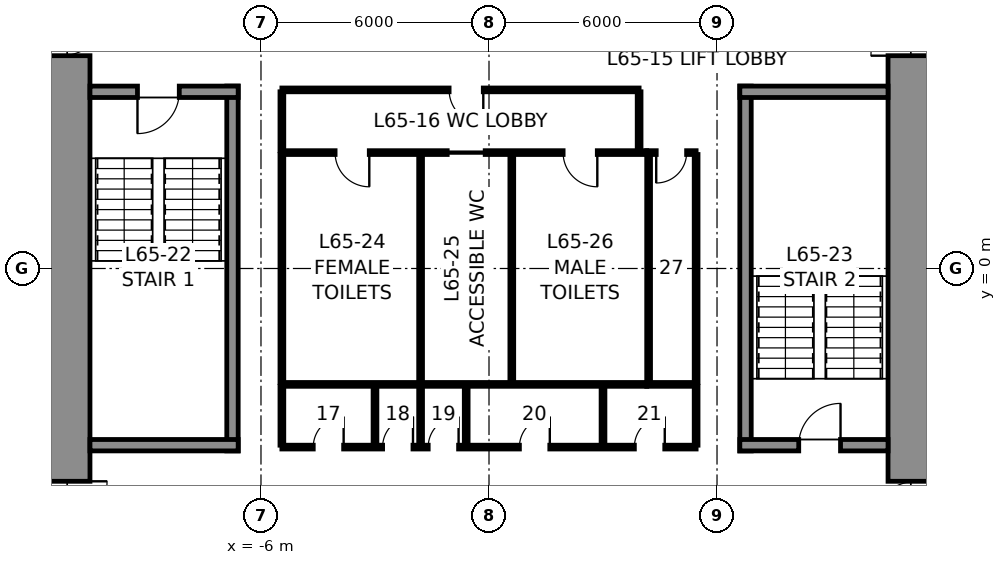
"""IFC4 building model, lengths in metres.
Left out: names, types, materials, properties, quantities, classifications, styles, units other than length and angle.
Written with IfcOpenShell. Run it as: python <this file> out.ifc"""

import sys

from ifc_helpers import new_model, si_unit, direction, frame, frame_2d, origin, place, context, subcontext, project, spatial, rectangle, extrude, element, fill, save


model = new_model("IFC4")
c1 = context("Model", 3, precision=1e-05, world=origin(), true_north=direction((0.0, 1.0)))
c2 = subcontext(c1, "Body", "Model", "MODEL_VIEW")
j1 = project(units=[si_unit("LENGTHUNIT", "METRE"), si_unit("PLANEANGLEUNIT", "RADIAN")], contexts=[c1])
p1 = place(None, origin())
s1 = spatial("IfcSite", under=j1, at=p1, CompositionType="ELEMENT")
p2 = place(p1, origin())
s2 = spatial("IfcBuilding", under=s1, at=p2, CompositionType="ELEMENT")
p3 = place(p2, frame((0.0, 0.0, 289.8)))
s3 = spatial("IfcBuildingStorey", under=s2, at=p3, CompositionType="ELEMENT", Elevation=289.8)
p4 = place(p3, frame((11.25, 10.5, 0.0), z_axis=(0.0, 0.0, 1.0), x_axis=(0.0, -1.0, 0.0)))
e1 = element("IfcWall", 1, at=p4, inside=s3, PredefinedType="SHEAR", context=c2, shape_type="SweptSolid", body=[
    extrude(rectangle(XDim=21.0, YDim=1.5, at=frame_2d((10.5, 0.0))), origin(), (0.0, 0.0, 1.0), 4.0),
])
p5 = place(p4, frame((3.7, 0.0, 0.0)))
e2 = element("IfcOpeningElement", 2, at=p5, cuts=e1, PredefinedType="OPENING", context=c2, shape_type="SweptSolid", body=[
    extrude(rectangle(XDim=1.2, YDim=2.3, at=frame_2d((0.6, 1.15))), frame((0.0, 0.76, 0.0), z_axis=(0.0, -1.0, 0.0), x_axis=(1.0, 0.0, 0.0)), (0.0, 0.0, 1.0), 1.52),
])
p6 = place(p4, frame((16.1, 0.0, 0.0)))
e3 = element("IfcOpeningElement", 3, at=p6, cuts=e1, PredefinedType="OPENING", context=c2, shape_type="SweptSolid", body=[
    extrude(rectangle(XDim=1.2, YDim=2.3, at=frame_2d((0.6, 1.15))), frame((0.0, 0.76, 0.0), z_axis=(0.0, -1.0, 0.0), x_axis=(1.0, 0.0, 0.0)), (0.0, 0.0, 1.0), 1.52),
])
p7 = place(p3, frame((-11.25, -10.5, 0.0), z_axis=(0.0, 0.0, 1.0), x_axis=(0.0, 1.0, 0.0)))
e4 = element("IfcWall", 4, at=p7, inside=s3, PredefinedType="SHEAR", context=c2, shape_type="SweptSolid", body=[
    extrude(rectangle(XDim=21.0, YDim=1.5, at=frame_2d((10.5, 0.0))), origin(), (0.0, 0.0, 1.0), 4.0),
])
p8 = place(p7, frame((16.1, 0.0, 0.0)))
e5 = element("IfcOpeningElement", 5, at=p8, cuts=e4, PredefinedType="OPENING", context=c2, shape_type="SweptSolid", body=[
    extrude(rectangle(XDim=1.2, YDim=2.3, at=frame_2d((0.6, 1.15))), frame((0.0, 0.76, 0.0), z_axis=(0.0, -1.0, 0.0), x_axis=(1.0, 0.0, 0.0)), (0.0, 0.0, 1.0), 1.52),
])
p9 = place(p7, frame((3.7, 0.0, 0.0)))
e6 = element("IfcOpeningElement", 6, at=p9, cuts=e4, PredefinedType="OPENING", context=c2, shape_type="SweptSolid", body=[
    extrude(rectangle(XDim=1.2, YDim=2.3, at=frame_2d((0.6, 1.15))), frame((0.0, 0.76, 0.0), z_axis=(0.0, -1.0, 0.0), x_axis=(1.0, 0.0, 0.0)), (0.0, 0.0, 1.0), 1.52),
])
p10 = place(p3, frame((-6.75, -4.8, 0.0), z_axis=(0.0, 0.0, 1.0), x_axis=(0.0, 1.0, 0.0)))
e7 = element("IfcWall", 7, at=p10, inside=s3, PredefinedType="SOLIDWALL", context=c2, shape_type="SweptSolid", body=[
    extrude(rectangle(XDim=9.6, YDim=0.3, at=frame_2d((4.8, 0.0))), origin(), (0.0, 0.0, 1.0), 3.75),
])
p11 = place(p3, frame((-10.5, 4.65, 0.0), z_axis=(0.0, 0.0, 1.0), x_axis=(1.0, 0.0, 0.0)))
e8 = element("IfcWall", 8, at=p11, inside=s3, PredefinedType="SOLIDWALL", context=c2, shape_type="SweptSolid", body=[
    extrude(rectangle(XDim=3.9, YDim=0.3, at=frame_2d((1.95, 0.0))), origin(), (0.0, 0.0, 1.0), 3.75),
])
p12 = place(p11, frame((1.25, 0.0, 0.0)))
e9 = element("IfcOpeningElement", 9, at=p12, cuts=e8, PredefinedType="OPENING", context=c2, shape_type="SweptSolid", body=[
    extrude(rectangle(XDim=1.1, YDim=2.3, at=frame_2d((0.55, 1.15))), frame((0.0, 0.16, 0.0), z_axis=(0.0, -1.0, 0.0), x_axis=(1.0, 0.0, 0.0)), (0.0, 0.0, 1.0), 0.32),
])
p13 = place(p3, frame((-6.6, -4.65, 0.0), z_axis=(0.0, 0.0, 1.0), x_axis=(-1.0, 0.0, 0.0)))
e10 = element("IfcWall", 10, at=p13, inside=s3, PredefinedType="SOLIDWALL", context=c2, shape_type="SweptSolid", body=[
    extrude(rectangle(XDim=3.9, YDim=0.3, at=frame_2d((1.95, 0.0))), origin(), (0.0, 0.0, 1.0), 3.75),
])
p14 = place(p3, frame((6.75, -4.8, 0.0), z_axis=(0.0, 0.0, 1.0), x_axis=(0.0, 1.0, 0.0)))
e11 = element("IfcWall", 11, at=p14, inside=s3, PredefinedType="SOLIDWALL", context=c2, shape_type="SweptSolid", body=[
    extrude(rectangle(XDim=9.6, YDim=0.3, at=frame_2d((4.8, 0.0))), origin(), (0.0, 0.0, 1.0), 3.75),
])
p15 = place(p3, frame((6.6, 4.65, 0.0), z_axis=(0.0, 0.0, 1.0), x_axis=(1.0, 0.0, 0.0)))
e12 = element("IfcWall", 12, at=p15, inside=s3, PredefinedType="SOLIDWALL", context=c2, shape_type="SweptSolid", body=[
    extrude(rectangle(XDim=3.9, YDim=0.3, at=frame_2d((1.95, 0.0))), origin(), (0.0, 0.0, 1.0), 3.75),
])
p16 = place(p3, frame((10.5, -4.65, 0.0), z_axis=(0.0, 0.0, 1.0), x_axis=(-1.0, 0.0, 0.0)))
e13 = element("IfcWall", 13, at=p16, inside=s3, PredefinedType="SOLIDWALL", context=c2, shape_type="SweptSolid", body=[
    extrude(rectangle(XDim=3.9, YDim=0.3, at=frame_2d((1.95, 0.0))), origin(), (0.0, 0.0, 1.0), 3.75),
])
p17 = place(p16, frame((1.25, 0.0, 0.0)))
e14 = element("IfcOpeningElement", 14, at=p17, cuts=e13, PredefinedType="OPENING", context=c2, shape_type="SweptSolid", body=[
    extrude(rectangle(XDim=1.1, YDim=2.3, at=frame_2d((0.55, 1.15))), frame((0.0, 0.16, 0.0), z_axis=(0.0, -1.0, 0.0), x_axis=(1.0, 0.0, 0.0)), (0.0, 0.0, 1.0), 0.32),
])
p18 = place(p3, frame((-5.45, 3.05, 0.0), z_axis=(0.0, 0.0, 1.0), x_axis=(1.0, 0.0, 0.0)))
e15 = element("IfcWall", 15, at=p18, inside=s3, PredefinedType="PARTITIONING", context=c2, shape_type="SweptSolid", body=[
    extrude(rectangle(XDim=9.6, YDim=0.1, at=frame_2d((4.8, 0.0))), origin(), (0.0, 0.0, 1.0), 3.75),
])
p19 = place(p18, frame((1.4, 0.0, 0.0)))
e16 = element("IfcOpeningElement", 16, at=p19, cuts=e15, PredefinedType="OPENING", context=c2, shape_type="SweptSolid", body=[
    extrude(rectangle(XDim=0.9, YDim=2.3, at=frame_2d((0.45, 1.15))), frame((0.0, 0.06, 0.0), z_axis=(0.0, -1.0, 0.0), x_axis=(1.0, 0.0, 0.0)), (0.0, 0.0, 1.0), 0.12),
])
p20 = place(p18, frame((4.35, 0.0, 0.0)))
e17 = element("IfcOpeningElement", 17, at=p20, cuts=e15, PredefinedType="OPENING", context=c2, shape_type="SweptSolid", body=[
    extrude(rectangle(XDim=1.0, YDim=2.3, at=frame_2d((0.5, 1.15))), frame((0.0, 0.06, 0.0), z_axis=(0.0, -1.0, 0.0), x_axis=(1.0, 0.0, 0.0)), (0.0, 0.0, 1.0), 0.12),
])
p21 = place(p18, frame((7.4, 0.0, 0.0)))
e18 = element("IfcOpeningElement", 18, at=p21, cuts=e15, PredefinedType="OPENING", context=c2, shape_type="SweptSolid", body=[
    extrude(rectangle(XDim=0.9, YDim=2.3, at=frame_2d((0.45, 1.15))), frame((0.0, 0.06, 0.0), z_axis=(0.0, -1.0, 0.0), x_axis=(1.0, 0.0, 0.0)), (0.0, 0.0, 1.0), 0.12),
])
p22 = place(p3, frame((4.15, 3.05, 0.0), z_axis=(0.0, 0.0, 1.0), x_axis=(1.0, 0.0, 0.0)))
e19 = element("IfcWall", 19, at=p22, inside=s3, PredefinedType="PARTITIONING", context=c2, shape_type="SweptSolid", body=[
    extrude(rectangle(XDim=1.3, YDim=0.1, at=frame_2d((0.65, 0.0))), origin(), (0.0, 0.0, 1.0), 3.75),
])
p23 = place(p22, frame((0.25, 0.0, 0.0)))
e20 = element("IfcOpeningElement", 20, at=p23, cuts=e19, PredefinedType="OPENING", context=c2, shape_type="SweptSolid", body=[
    extrude(rectangle(XDim=0.8, YDim=2.3, at=frame_2d((0.4, 1.15))), frame((0.0, 0.06, 0.0), z_axis=(0.0, -1.0, 0.0), x_axis=(1.0, 0.0, 0.0)), (0.0, 0.0, 1.0), 0.12),
])
p24 = place(p3, frame((4.15, -3.05, 0.0), z_axis=(0.0, 0.0, 1.0), x_axis=(-1.0, 0.0, 0.0)))
e21 = element("IfcWall", 21, at=p24, inside=s3, PredefinedType="PARTITIONING", context=c2, shape_type="SweptSolid", body=[
    extrude(rectangle(XDim=9.6, YDim=0.1, at=frame_2d((4.8, 0.0))), origin(), (0.0, 0.0, 1.0), 3.75),
])
p25 = place(p3, frame((5.45, -3.05, 0.0), z_axis=(0.0, 0.0, 1.0), x_axis=(-1.0, 0.0, 0.0)))
e22 = element("IfcWall", 22, at=p25, inside=s3, PredefinedType="PARTITIONING", context=c2, shape_type="SweptSolid", body=[
    extrude(rectangle(XDim=1.3, YDim=0.1, at=frame_2d((0.65, 0.0))), origin(), (0.0, 0.0, 1.0), 3.75),
])
for number, where, z_axis, x_axis in (
    (23, (5.45, 3.0, 0.0), (0.0, 0.0, 1.0), (0.0, -1.0, 0.0)),
    (24, (-5.45, -3.0, 0.0), (0.0, 0.0, 1.0), (0.0, 1.0, 0.0)),
    (25, (-1.8, -3.0, 0.0), (0.0, 0.0, 1.0), (0.0, 1.0, 0.0)),
    (26, (0.6, -3.0, 0.0), (0.0, 0.0, 1.0), (0.0, 1.0, 0.0)),
    (27, (4.2, -3.0, 0.0), (0.0, 0.0, 1.0), (0.0, 1.0, 0.0)),
):
    element("IfcWall", number, at=place(p3, frame(where, z_axis=z_axis, x_axis=x_axis)), inside=s3, PredefinedType="PARTITIONING", context=c2, shape_type="SweptSolid", body=[
        extrude(rectangle(XDim=6.0, YDim=0.1, at=frame_2d((3.0, 0.0))), origin(), (0.0, 0.0, 1.0), 3.75),
    ])
p26 = place(p3, frame((-5.45, 4.7, 0.0), z_axis=(0.0, 0.0, 1.0), x_axis=(1.0, 0.0, 0.0)))
e28 = element("IfcWall", 28, at=p26, inside=s3, PredefinedType="PARTITIONING", context=c2, shape_type="SweptSolid", body=[
    extrude(rectangle(XDim=9.4, YDim=0.1, at=frame_2d((4.7, 0.0))), origin(), (0.0, 0.0, 1.0), 3.75),
])
p27 = place(p26, frame((4.4, 0.0, 0.0)))
e29 = element("IfcOpeningElement", 29, at=p27, cuts=e28, PredefinedType="OPENING", context=c2, shape_type="SweptSolid", body=[
    extrude(rectangle(XDim=0.9, YDim=2.3, at=frame_2d((0.45, 1.15))), frame((0.0, 0.06, 0.0), z_axis=(0.0, -1.0, 0.0), x_axis=(1.0, 0.0, 0.0)), (0.0, 0.0, 1.0), 0.12),
])
for number, where, z_axis, x_axis in (
    (30, (-5.45, 3.1, 0.0), (0.0, 0.0, 1.0), (0.0, 1.0, 0.0)),
    (31, (3.95, 3.1, 0.0), (0.0, 0.0, 1.0), (0.0, 1.0, 0.0)),
):
    element("IfcWall", number, at=place(p3, frame(where, z_axis=z_axis, x_axis=x_axis)), inside=s3, PredefinedType="PARTITIONING", context=c2, shape_type="SweptSolid", body=[
        extrude(rectangle(XDim=1.55, YDim=0.1, at=frame_2d((0.775, 0.0))), origin(), (0.0, 0.0, 1.0), 3.75),
    ])
p28 = place(p3, frame((5.45, -4.7, 0.0), z_axis=(0.0, 0.0, 1.0), x_axis=(-1.0, 0.0, 0.0)))
e32 = element("IfcWall", 32, at=p28, inside=s3, PredefinedType="PARTITIONING", context=c2, shape_type="SweptSolid", body=[
    extrude(rectangle(XDim=10.9, YDim=0.1, at=frame_2d((5.45, 0.0))), origin(), (0.0, 0.0, 1.0), 3.75),
])
p29 = place(p28, frame((9.275, 0.0, 0.0)))
e33 = element("IfcOpeningElement", 33, at=p29, cuts=e32, PredefinedType="OPENING", context=c2, shape_type="SweptSolid", body=[
    extrude(rectangle(XDim=0.8, YDim=2.3, at=frame_2d((0.4, 1.15))), frame((0.0, 0.06, 0.0), z_axis=(0.0, -1.0, 0.0), x_axis=(1.0, 0.0, 0.0)), (0.0, 0.0, 1.0), 0.12),
])
p30 = place(p28, frame((7.45, 0.0, 0.0)))
e34 = element("IfcOpeningElement", 34, at=p30, cuts=e32, PredefinedType="OPENING", context=c2, shape_type="SweptSolid", body=[
    extrude(rectangle(XDim=0.8, YDim=2.3, at=frame_2d((0.4, 1.15))), frame((0.0, 0.06, 0.0), z_axis=(0.0, -1.0, 0.0), x_axis=(1.0, 0.0, 0.0)), (0.0, 0.0, 1.0), 0.12),
])
p31 = place(p28, frame((6.25, 0.0, 0.0)))
e35 = element("IfcOpeningElement", 35, at=p31, cuts=e32, PredefinedType="OPENING", context=c2, shape_type="SweptSolid", body=[
    extrude(rectangle(XDim=0.8, YDim=2.3, at=frame_2d((0.4, 1.15))), frame((0.0, 0.06, 0.0), z_axis=(0.0, -1.0, 0.0), x_axis=(1.0, 0.0, 0.0)), (0.0, 0.0, 1.0), 0.12),
])
p32 = place(p28, frame((3.85, 0.0, 0.0)))
e36 = element("IfcOpeningElement", 36, at=p32, cuts=e32, PredefinedType="OPENING", context=c2, shape_type="SweptSolid", body=[
    extrude(rectangle(XDim=0.8, YDim=2.3, at=frame_2d((0.4, 1.15))), frame((0.0, 0.06, 0.0), z_axis=(0.0, -1.0, 0.0), x_axis=(1.0, 0.0, 0.0)), (0.0, 0.0, 1.0), 0.12),
])
p33 = place(p28, frame((0.825, 0.0, 0.0)))
e37 = element("IfcOpeningElement", 37, at=p33, cuts=e32, PredefinedType="OPENING", context=c2, shape_type="SweptSolid", body=[
    extrude(rectangle(XDim=0.8, YDim=2.3, at=frame_2d((0.4, 1.15))), frame((0.0, 0.06, 0.0), z_axis=(0.0, -1.0, 0.0), x_axis=(1.0, 0.0, 0.0)), (0.0, 0.0, 1.0), 0.12),
])
for number, where, z_axis, x_axis in (
    (38, (-5.45, -3.1, 0.0), (0.0, 0.0, 1.0), (0.0, -1.0, 0.0)),
    (39, (5.45, -3.1, 0.0), (0.0, 0.0, 1.0), (0.0, -1.0, 0.0)),
    (40, (-3.0, -3.1, 0.0), (0.0, 0.0, 1.0), (0.0, -1.0, 0.0)),
    (41, (-1.8, -3.1, 0.0), (0.0, 0.0, 1.0), (0.0, -1.0, 0.0)),
    (42, (-0.6, -3.1, 0.0), (0.0, 0.0, 1.0), (0.0, -1.0, 0.0)),
    (43, (3.0, -3.1, 0.0), (0.0, 0.0, 1.0), (0.0, -1.0, 0.0)),
):
    element("IfcWall", number, at=place(p3, frame(where, z_axis=z_axis, x_axis=x_axis)), inside=s3, PredefinedType="PARTITIONING", context=c2, shape_type="SweptSolid", body=[
        extrude(rectangle(XDim=1.55, YDim=0.1, at=frame_2d((0.775, 0.0))), origin(), (0.0, 0.0, 1.0), 3.75),
    ])
p34 = place(p12, frame((1.1, 0.0, 0.0), z_axis=(0.0, 0.0, 1.0), x_axis=(-1.0, 0.0, 0.0)))
e44 = element("IfcDoor", 44, at=p34, inside=s3, OperationType="SINGLE_SWING_RIGHT", PredefinedType="DOOR", context=c2, shape_type="SweptSolid", body=[
    extrude(rectangle(XDim=1.1, YDim=2.3, at=frame_2d((0.55, 1.15))), frame((0.0, 0.025, 0.0), z_axis=(0.0, -1.0, 0.0), x_axis=(1.0, 0.0, 0.0)), (0.0, 0.0, 1.0), 0.05),
])
fill(e9, e44)
p35 = place(p17, frame((1.1, 0.0, 0.0), z_axis=(0.0, 0.0, 1.0), x_axis=(-1.0, 0.0, 0.0)))
e45 = element("IfcDoor", 45, at=p35, inside=s3, OperationType="SINGLE_SWING_RIGHT", PredefinedType="DOOR", context=c2, shape_type="SweptSolid", body=[
    extrude(rectangle(XDim=1.1, YDim=2.3, at=frame_2d((0.55, 1.15))), frame((0.0, 0.025, 0.0), z_axis=(0.0, -1.0, 0.0), x_axis=(1.0, 0.0, 0.0)), (0.0, 0.0, 1.0), 0.05),
])
fill(e14, e45)
p36 = place(p19, frame((0.9, 0.0, 0.0), z_axis=(0.0, 0.0, 1.0), x_axis=(-1.0, 0.0, 0.0)))
e46 = element("IfcDoor", 46, at=p36, inside=s3, OperationType="SINGLE_SWING_LEFT", PredefinedType="DOOR", context=c2, shape_type="SweptSolid", body=[
    extrude(rectangle(XDim=0.9, YDim=2.3, at=frame_2d((0.45, 1.15))), frame((0.0, 0.025, 0.0), z_axis=(0.0, -1.0, 0.0), x_axis=(1.0, 0.0, 0.0)), (0.0, 0.0, 1.0), 0.05),
])
fill(e16, e46)
p37 = place(p20, frame((1.0, 0.0, 0.0), z_axis=(0.0, 0.0, 1.0), x_axis=(-1.0, 0.0, 0.0)))
e47 = element("IfcDoor", 47, at=p37, inside=s3, OperationType="SLIDING_TO_LEFT", PredefinedType="DOOR", context=c2, shape_type="SweptSolid", body=[
    extrude(rectangle(XDim=1.0, YDim=2.3, at=frame_2d((0.5, 1.15))), frame((0.0, 0.025, 0.0), z_axis=(0.0, -1.0, 0.0), x_axis=(1.0, 0.0, 0.0)), (0.0, 0.0, 1.0), 0.05),
])
fill(e17, e47)
p38 = place(p21, frame((0.9, 0.0, 0.0), z_axis=(0.0, 0.0, 1.0), x_axis=(-1.0, 0.0, 0.0)))
e48 = element("IfcDoor", 48, at=p38, inside=s3, OperationType="SINGLE_SWING_LEFT", PredefinedType="DOOR", context=c2, shape_type="SweptSolid", body=[
    extrude(rectangle(XDim=0.9, YDim=2.3, at=frame_2d((0.45, 1.15))), frame((0.0, 0.025, 0.0), z_axis=(0.0, -1.0, 0.0), x_axis=(1.0, 0.0, 0.0)), (0.0, 0.0, 1.0), 0.05),
])
fill(e18, e48)
p39 = place(p23, frame((0.8, 0.0, 0.0), z_axis=(0.0, 0.0, 1.0), x_axis=(-1.0, 0.0, 0.0)))
e49 = element("IfcDoor", 49, at=p39, inside=s3, OperationType="SINGLE_SWING_RIGHT", PredefinedType="DOOR", context=c2, shape_type="SweptSolid", body=[
    extrude(rectangle(XDim=0.8, YDim=2.3, at=frame_2d((0.4, 1.15))), frame((0.0, 0.025, 0.0), z_axis=(0.0, -1.0, 0.0), x_axis=(1.0, 0.0, 0.0)), (0.0, 0.0, 1.0), 0.05),
])
fill(e20, e49)
p40 = place(p27, frame((0.9, 0.0, 0.0), z_axis=(0.0, 0.0, 1.0), x_axis=(-1.0, 0.0, 0.0)))
e50 = element("IfcDoor", 50, at=p40, inside=s3, OperationType="SINGLE_SWING_LEFT", PredefinedType="DOOR", context=c2, shape_type="SweptSolid", body=[
    extrude(rectangle(XDim=0.9, YDim=2.3, at=frame_2d((0.45, 1.15))), frame((0.0, 0.025, 0.0), z_axis=(0.0, -1.0, 0.0), x_axis=(1.0, 0.0, 0.0)), (0.0, 0.0, 1.0), 0.05),
])
fill(e29, e50)
p41 = place(p29, frame((0.8, 0.0, 0.0), z_axis=(0.0, 0.0, 1.0), x_axis=(-1.0, 0.0, 0.0)))
e51 = element("IfcDoor", 51, at=p41, inside=s3, OperationType="SINGLE_SWING_RIGHT", PredefinedType="DOOR", context=c2, shape_type="SweptSolid", body=[
    extrude(rectangle(XDim=0.8, YDim=2.3, at=frame_2d((0.4, 1.15))), frame((0.0, 0.025, 0.0), z_axis=(0.0, -1.0, 0.0), x_axis=(1.0, 0.0, 0.0)), (0.0, 0.0, 1.0), 0.05),
])
fill(e33, e51)
p42 = place(p30, frame((0.8, 0.0, 0.0), z_axis=(0.0, 0.0, 1.0), x_axis=(-1.0, 0.0, 0.0)))
e52 = element("IfcDoor", 52, at=p42, inside=s3, OperationType="SINGLE_SWING_RIGHT", PredefinedType="DOOR", context=c2, shape_type="SweptSolid", body=[
    extrude(rectangle(XDim=0.8, YDim=2.3, at=frame_2d((0.4, 1.15))), frame((0.0, 0.025, 0.0), z_axis=(0.0, -1.0, 0.0), x_axis=(1.0, 0.0, 0.0)), (0.0, 0.0, 1.0), 0.05),
])
fill(e34, e52)
p43 = place(p31, frame((0.8, 0.0, 0.0), z_axis=(0.0, 0.0, 1.0), x_axis=(-1.0, 0.0, 0.0)))
e53 = element("IfcDoor", 53, at=p43, inside=s3, OperationType="SINGLE_SWING_RIGHT", PredefinedType="DOOR", context=c2, shape_type="SweptSolid", body=[
    extrude(rectangle(XDim=0.8, YDim=2.3, at=frame_2d((0.4, 1.15))), frame((0.0, 0.025, 0.0), z_axis=(0.0, -1.0, 0.0), x_axis=(1.0, 0.0, 0.0)), (0.0, 0.0, 1.0), 0.05),
])
fill(e35, e53)
p44 = place(p32, frame((0.8, 0.0, 0.0), z_axis=(0.0, 0.0, 1.0), x_axis=(-1.0, 0.0, 0.0)))
e54 = element("IfcDoor", 54, at=p44, inside=s3, OperationType="SINGLE_SWING_RIGHT", PredefinedType="DOOR", context=c2, shape_type="SweptSolid", body=[
    extrude(rectangle(XDim=0.8, YDim=2.3, at=frame_2d((0.4, 1.15))), frame((0.0, 0.025, 0.0), z_axis=(0.0, -1.0, 0.0), x_axis=(1.0, 0.0, 0.0)), (0.0, 0.0, 1.0), 0.05),
])
fill(e36, e54)
p45 = place(p33, frame((0.8, 0.0, 0.0), z_axis=(0.0, 0.0, 1.0), x_axis=(-1.0, 0.0, 0.0)))
e55 = element("IfcDoor", 55, at=p45, inside=s3, OperationType="SINGLE_SWING_RIGHT", PredefinedType="DOOR", context=c2, shape_type="SweptSolid", body=[
    extrude(rectangle(XDim=0.8, YDim=2.3, at=frame_2d((0.4, 1.15))), frame((0.0, 0.025, 0.0), z_axis=(0.0, -1.0, 0.0), x_axis=(1.0, 0.0, 0.0)), (0.0, 0.0, 1.0), 0.05),
])
fill(e37, e55)
p46 = place(p8, frame((1.2, 0.0, 0.0), z_axis=(0.0, 0.0, 1.0), x_axis=(-1.0, 0.0, 0.0)))
e56 = element("IfcDoor", 56, at=p46, inside=s3, OperationType="SINGLE_SWING_LEFT", PredefinedType="DOOR", context=c2, shape_type="SweptSolid", body=[
    extrude(rectangle(XDim=1.2, YDim=2.3, at=frame_2d((0.6, 1.15))), frame((0.0, 0.025, 0.0), z_axis=(0.0, -1.0, 0.0), x_axis=(1.0, 0.0, 0.0)), (0.0, 0.0, 1.0), 0.05),
])
fill(e5, e56)
p47 = place(p9, frame((1.2, 0.0, 0.0), z_axis=(0.0, 0.0, 1.0), x_axis=(-1.0, 0.0, 0.0)))
e57 = element("IfcDoor", 57, at=p47, inside=s3, OperationType="SINGLE_SWING_LEFT", PredefinedType="DOOR", context=c2, shape_type="SweptSolid", body=[
    extrude(rectangle(XDim=1.2, YDim=2.3, at=frame_2d((0.6, 1.15))), frame((0.0, 0.025, 0.0), z_axis=(0.0, -1.0, 0.0), x_axis=(1.0, 0.0, 0.0)), (0.0, 0.0, 1.0), 0.05),
])
fill(e6, e57)
p48 = place(p5, frame((1.2, 0.0, 0.0), z_axis=(0.0, 0.0, 1.0), x_axis=(-1.0, 0.0, 0.0)))
e58 = element("IfcDoor", 58, at=p48, inside=s3, OperationType="SINGLE_SWING_LEFT", PredefinedType="DOOR", context=c2, shape_type="SweptSolid", body=[
    extrude(rectangle(XDim=1.2, YDim=2.3, at=frame_2d((0.6, 1.15))), frame((0.0, 0.025, 0.0), z_axis=(0.0, -1.0, 0.0), x_axis=(1.0, 0.0, 0.0)), (0.0, 0.0, 1.0), 0.05),
])
fill(e2, e58)
p49 = place(p6, frame((1.2, 0.0, 0.0), z_axis=(0.0, 0.0, 1.0), x_axis=(-1.0, 0.0, 0.0)))
e59 = element("IfcDoor", 59, at=p49, inside=s3, OperationType="SINGLE_SWING_LEFT", PredefinedType="DOOR", context=c2, shape_type="SweptSolid", body=[
    extrude(rectangle(XDim=1.2, YDim=2.3, at=frame_2d((0.6, 1.15))), frame((0.0, 0.025, 0.0), z_axis=(0.0, -1.0, 0.0), x_axis=(1.0, 0.0, 0.0)), (0.0, 0.0, 1.0), 0.05),
])
fill(e3, e59)
save(model, sys.argv[1])
